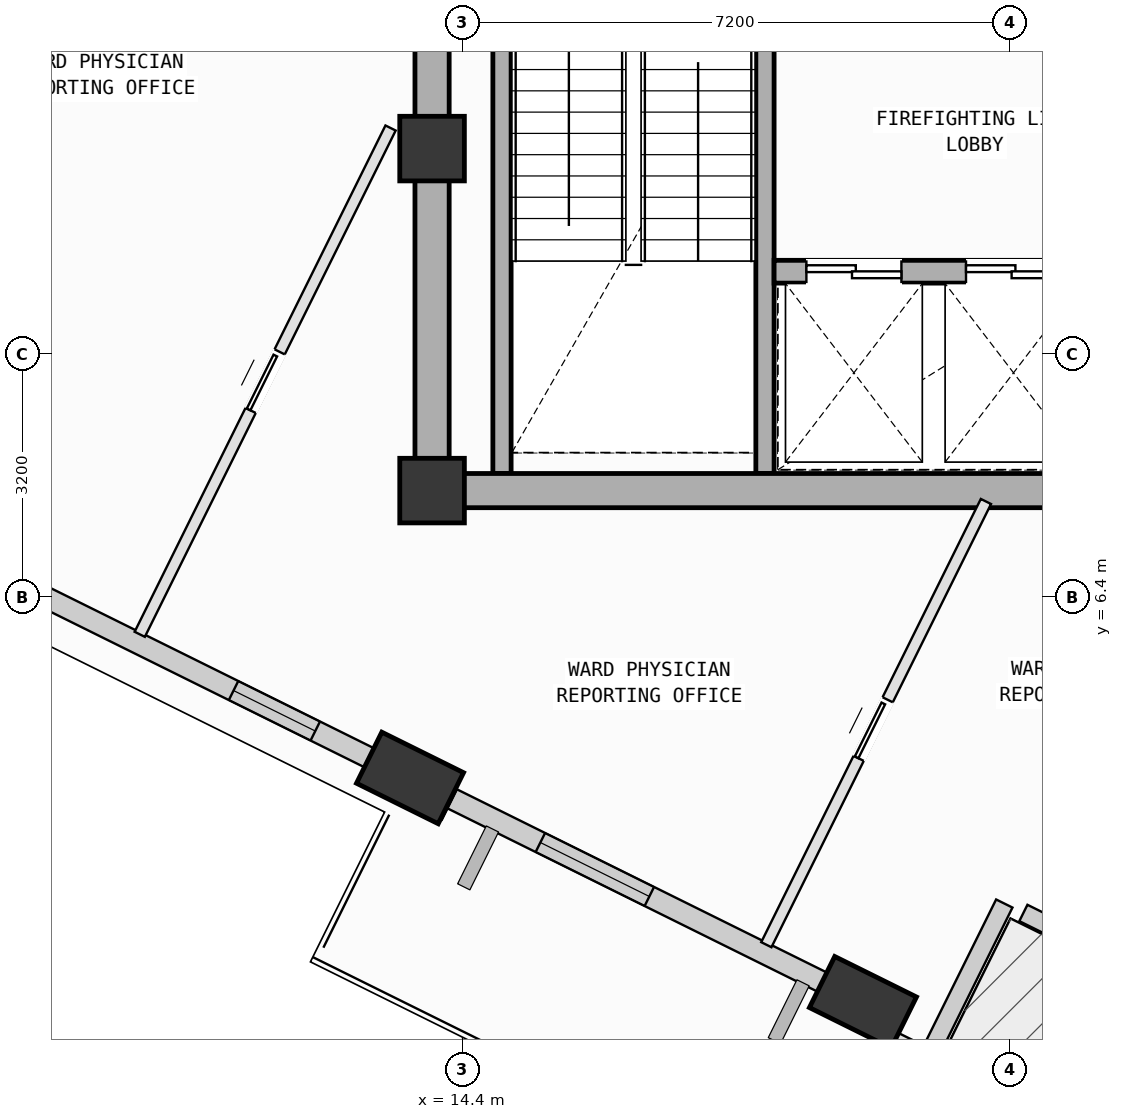
"""IFC4 building model, lengths in metres.
Left out: names, types, materials, properties, quantities, classifications, styles, units other than length and angle.
Written with IfcOpenShell. Run it as: python <this file> out.ifc"""

import sys

from ifc_helpers import new_model, si_unit, direction, frame, frame_2d, origin, origin_2d, place, context, subcontext, project, spatial, rectangle, extrude, element, fill, save


model = new_model("IFC4")
c1 = context("Model", 3, precision=1e-05, world=origin(), true_north=direction((0.0, 1.0)))
c2 = subcontext(c1, "Body", "Model", "MODEL_VIEW")
j1 = project(units=[si_unit("LENGTHUNIT", "METRE"), si_unit("PLANEANGLEUNIT", "RADIAN")], contexts=[c1])
p1 = place(None, origin())
s1 = spatial("IfcSite", under=j1, at=p1, CompositionType="ELEMENT")
p2 = place(p1, origin())
s2 = spatial("IfcBuilding", under=s1, at=p2, CompositionType="ELEMENT")
p3 = place(p2, frame((0.0, 0.0, 296.6)))
s3 = spatial("IfcBuildingStorey", under=s2, at=p3, CompositionType="ELEMENT", Elevation=296.6)
for number, where, z_axis, x_axis in (
    (1, (14.0, 7.8, 0.0), (0.0, 0.0, 1.0), (1.0, 0.0, 0.0)),
    (2, (14.0, 12.3, 0.0), (0.0, 0.0, 1.0), (1.0, 0.0, 0.0)),
):
    element("IfcColumn", number, at=place(p3, frame(where, z_axis=z_axis, x_axis=x_axis)), inside=s3, PredefinedType="COLUMN", context=c2, shape_type="SweptSolid", body=[
        extrude(rectangle(XDim=0.85, YDim=0.85, at=origin_2d()), origin(), (0.0, 0.0, 1.0), 4.0),
    ])
p4 = place(p3, frame((13.71, 4.019, 0.002), z_axis=(0.086199825799, -0.081164930977, 0.992966184727), x_axis=(-0.935172397804, -0.350272648593, 0.052551479838)))
e3 = element("IfcColumn", 3, at=p4, inside=s3, PredefinedType="COLUMN", context=c2, shape_type="SweptSolid", body=[
    extrude(rectangle(XDim=1.2, YDim=0.75, at=origin_2d()), origin(), (0.0, 0.0, 1.0), 4.025),
])
p5 = place(p3, frame((19.669, 1.067, 0.002), z_axis=(0.098208825475, -0.056509528132, 0.993560113848), x_axis=(-0.829149129966, -0.55676072121, 0.05029134711)))
e4 = element("IfcColumn", 4, at=p5, inside=s3, PredefinedType="COLUMN", context=c2, shape_type="SweptSolid", body=[
    extrude(rectangle(XDim=1.2, YDim=0.75, at=origin_2d()), origin(), (0.0, 0.0, 1.0), 4.022),
])
p6 = place(p3, frame((28.017, -0.846, 0.0), z_axis=(0.0, 0.0, 1.0), x_axis=(-0.89610459949, 0.443842930296, 0.0)))
e5 = element("IfcWall", 5, at=p6, inside=s3, PredefinedType="SOLIDWALL", context=c2, shape_type="SweptSolid", body=[
    extrude(rectangle(XDim=6.96, YDim=0.24, at=frame_2d((3.48, 0.0))), origin(), (0.0, 0.0, 1.0), 3.265),
])
p7 = place(p6, frame((2.04, 0.0, 0.0)))
e6 = element("IfcOpeningElement", 6, at=p7, cuts=e5, PredefinedType="OPENING", context=c2, shape_type="SweptSolid", body=[
    extrude(rectangle(XDim=1.1, YDim=2.15, at=frame_2d((0.55, 1.075))), frame((0.0, 0.13, 0.0), z_axis=(0.0, -1.0, 0.0), x_axis=(1.0, 0.0, 0.0)), (0.0, 0.0, 1.0), 0.26),
])
p8 = place(p3, frame((21.529, 2.367, 0.0), z_axis=(0.0, 0.0, 1.0), x_axis=(-0.443851040461, -0.896100582458, 0.0)))
e7 = element("IfcWall", 7, at=p8, inside=s3, PredefinedType="SOLIDWALL", context=c2, shape_type="SweptSolid", body=[
    extrude(rectangle(XDim=2.5, YDim=0.24, at=frame_2d((1.25, 0.0))), origin(), (0.0, 0.0, 1.0), 3.265),
])
p9 = place(p3, frame((13.563, 4.092, 0.0), z_axis=(0.0, 0.0, 1.0), x_axis=(-0.896112517924, 0.443826942873, 0.0)))
e8 = element("IfcWall", 8, at=p9, inside=s3, PredefinedType="SOLIDWALL", context=c2, shape_type="SweptSolid", body=[
    extrude(rectangle(XDim=5.83, YDim=0.28, at=frame_2d((2.915, 0.0))), origin(), (0.0, 0.0, 1.0), 3.265),
])
p10 = place(p9, frame((1.228, 0.0, 0.75)))
e9 = element("IfcOpeningElement", 9, at=p10, cuts=e8, PredefinedType="OPENING", context=c2, shape_type="SweptSolid", body=[
    extrude(rectangle(XDim=1.2, YDim=1.75, at=frame_2d((0.6, 0.875))), frame((0.0, 0.15, 0.0), z_axis=(0.0, -1.0, 0.0), x_axis=(1.0, 0.0, 0.0)), (0.0, 0.0, 1.0), 0.3),
])
p11 = place(p3, frame((19.517, 1.143, 0.0), z_axis=(0.0, 0.0, 1.0), x_axis=(-0.896103760266, 0.443844624658, 0.0)))
e10 = element("IfcWall", 10, at=p11, inside=s3, PredefinedType="SOLIDWALL", context=c2, shape_type="SweptSolid", body=[
    extrude(rectangle(XDim=5.861, YDim=0.28, at=frame_2d((2.93, 0.0))), origin(), (0.0, 0.0, 1.0), 3.245),
])
p12 = place(p11, frame((2.967, 0.0, 0.75)))
e11 = element("IfcOpeningElement", 11, at=p12, cuts=e10, PredefinedType="OPENING", context=c2, shape_type="SweptSolid", body=[
    extrude(rectangle(XDim=1.6, YDim=1.95, at=frame_2d((0.8, 0.975))), frame((0.0, 0.15, 0.0), z_axis=(0.0, -1.0, 0.0), x_axis=(1.0, 0.0, 0.0)), (0.0, 0.0, 1.0), 0.3),
])
for number, where, z_axis, x_axis in (
    (12, (18.38, 15.12, 0.0), (0.0, 0.0, 1.0), (0.0, -1.0, 0.0)),
    (13, (14.92, 8.025, 0.0), (0.0, 0.0, 1.0), (0.0, 1.0, 0.0)),
):
    element("IfcWall", number, at=place(p3, frame(where, z_axis=z_axis, x_axis=x_axis)), inside=s3, PredefinedType="SOLIDWALL", context=c2, shape_type="SweptSolid", body=[
        extrude(rectangle(XDim=7.095, YDim=0.24, at=frame_2d((3.548, 0.0))), origin(), (0.0, 0.0, 1.0), 3.78),
    ])
p13 = place(p3, frame((14.0, 7.8, 0.0), z_axis=(0.0, 0.0, 1.0), x_axis=(1.0, 0.0, 0.0)))
e14 = element("IfcWall", 14, at=p13, inside=s3, PredefinedType="SHEAR", context=c2, shape_type="SweptSolid", body=[
    extrude(rectangle(XDim=10.8, YDim=0.45, at=frame_2d((5.4, 0.0))), origin(), (0.0, 0.0, 1.0), 3.78),
])
p14 = place(p3, frame((14.0, 16.8, 0.0), z_axis=(0.0, 0.0, 1.0), x_axis=(0.0, -1.0, 0.0)))
e15 = element("IfcWall", 15, at=p14, inside=s3, PredefinedType="SHEAR", context=c2, shape_type="SweptSolid", body=[
    extrude(rectangle(XDim=9.0, YDim=0.45, at=frame_2d((4.5, 0.0))), origin(), (0.0, 0.0, 1.0), 3.78),
])
p15 = place(p3, frame((18.5, 10.68, 0.0), z_axis=(0.0, 0.0, 1.0), x_axis=(1.0, 0.0, 0.0)))
e16 = element("IfcWall", 16, at=p15, inside=s3, PredefinedType="SOLIDWALL", context=c2, shape_type="SweptSolid", body=[
    extrude(rectangle(XDim=5.3, YDim=0.3, at=frame_2d((2.65, 0.0))), origin(), (0.0, 0.0, 1.0), 3.78),
])
p16 = place(p15, frame((4.22, 0.0, 0.0)))
e17 = element("IfcOpeningElement", 17, at=p16, cuts=e16, PredefinedType="OPENING", context=c2, shape_type="SweptSolid", body=[
    extrude(rectangle(XDim=0.86, YDim=2.06, at=frame_2d((0.43, 1.03))), frame((0.0, 0.16, 0.0), z_axis=(0.0, -1.0, 0.0), x_axis=(1.0, 0.0, 0.0)), (0.0, 0.0, 1.0), 0.32),
])
p17 = place(p15, frame((0.425, 0.0, 0.0)))
e18 = element("IfcOpeningElement", 18, at=p17, cuts=e16, PredefinedType="OPENING", context=c2, shape_type="SweptSolid", body=[
    extrude(rectangle(XDim=1.25, YDim=2.18, at=frame_2d((0.625, 1.09))), frame((0.0, 0.16, 0.0), z_axis=(0.0, -1.0, 0.0), x_axis=(1.0, 0.0, 0.0)), (0.0, 0.0, 1.0), 0.32),
])
p18 = place(p15, frame((2.525, 0.0, 0.0)))
e19 = element("IfcOpeningElement", 19, at=p18, cuts=e16, PredefinedType="OPENING", context=c2, shape_type="SweptSolid", body=[
    extrude(rectangle(XDim=1.25, YDim=2.18, at=frame_2d((0.625, 1.09))), frame((0.0, 0.16, 0.0), z_axis=(0.0, -1.0, 0.0), x_axis=(1.0, 0.0, 0.0)), (0.0, 0.0, 1.0), 0.32),
])
p19 = place(p3, frame((20.458, 0.42, 0.0), z_axis=(0.0, 0.0, 1.0), x_axis=(-0.895932090446, 0.44419105046, 0.0)))
e20 = element("IfcWall", 20, at=p19, inside=s3, PredefinedType="PARTITIONING", context=c2, shape_type="SweptSolid", body=[
    extrude(rectangle(XDim=1.164, YDim=0.15, at=frame_2d((0.582, 0.0))), origin(), (0.0, 0.0, 1.0), 3.245),
])
p20 = place(p3, frame((18.398, 1.825, 0.0), z_axis=(0.0, 0.0, 1.0), x_axis=(0.443909549261, 0.89607159986, 0.0)))
e21 = element("IfcWall", 21, at=p20, inside=s3, PredefinedType="PARTITIONING", context=c2, shape_type="SweptSolid", body=[
    extrude(rectangle(XDim=6.509, YDim=0.15, at=frame_2d((3.254, 0.0))), origin(), (0.0, 0.0, 1.0), 3.78),
])
p21 = place(p20, frame((2.737, 0.0, 0.0)))
e22 = element("IfcOpeningElement", 22, at=p21, cuts=e21, PredefinedType="OPENING", context=c2, shape_type="SweptSolid", body=[
    extrude(rectangle(XDim=0.86, YDim=2.06, at=frame_2d((0.43, 1.03))), frame((0.0, 0.085, 0.0), z_axis=(0.0, -1.0, 0.0), x_axis=(1.0, 0.0, 0.0)), (0.0, 0.0, 1.0), 0.17),
])
p22 = place(p3, frame((14.163, 3.538, 0.0), z_axis=(0.0, 0.0, 1.0), x_axis=(-0.896041424615, 0.44397045552, 0.0)))
e23 = element("IfcWall", 23, at=p22, inside=s3, PredefinedType="PARTITIONING", context=c2, shape_type="SweptSolid", body=[
    extrude(rectangle(XDim=0.784, YDim=0.15, at=frame_2d((0.392, 0.0))), origin(), (0.0, 0.0, 1.0), 3.245),
])
p23 = place(p3, frame((10.154, 5.909, 0.0), z_axis=(0.0, 0.0, 1.0), x_axis=(0.443874121777, 0.896089149592, 0.0)))
e24 = element("IfcWall", 24, at=p23, inside=s3, PredefinedType="PARTITIONING", context=c2, shape_type="SweptSolid", body=[
    extrude(rectangle(XDim=7.435, YDim=0.15, at=frame_2d((3.717, 0.0))), origin(), (0.0, 0.0, 1.0), 3.78),
])
p24 = place(p23, frame((3.287, 0.0, 0.0)))
e25 = element("IfcOpeningElement", 25, at=p24, cuts=e24, PredefinedType="OPENING", context=c2, shape_type="SweptSolid", body=[
    extrude(rectangle(XDim=0.86, YDim=2.06, at=frame_2d((0.43, 1.03))), frame((0.0, 0.085, 0.0), z_axis=(0.0, -1.0, 0.0), x_axis=(1.0, 0.0, 0.0)), (0.0, 0.0, 1.0), 0.17),
])
p25 = place(p10, origin())
e26 = element("IfcWindow", 26, at=p25, inside=s3, PartitioningType="SINGLE_PANEL", PredefinedType="WINDOW", context=c2, shape_type="SweptSolid", body=[
    extrude(rectangle(XDim=1.2, YDim=1.75, at=frame_2d((0.6, 0.875))), frame((0.0, 0.03, 0.0), z_axis=(0.0, -1.0, 0.0), x_axis=(1.0, 0.0, 0.0)), (0.0, 0.0, 1.0), 0.06),
])
fill(e9, e26)
p26 = place(p12, origin())
e27 = element("IfcWindow", 27, at=p26, inside=s3, PartitioningType="SINGLE_PANEL", PredefinedType="WINDOW", context=c2, shape_type="SweptSolid", body=[
    extrude(rectangle(XDim=1.6, YDim=1.95, at=frame_2d((0.8, 0.975))), frame((0.0, 0.03, 0.0), z_axis=(0.0, -1.0, 0.0), x_axis=(1.0, 0.0, 0.0)), (0.0, 0.0, 1.0), 0.06),
])
fill(e11, e27)
p27 = place(p17, origin())
e28 = element("IfcDoor", 28, at=p27, inside=s3, OperationType="DOUBLE_DOOR_SLIDING", PredefinedType="DOOR", context=c2, shape_type="SweptSolid", body=[
    extrude(rectangle(XDim=1.25, YDim=2.18, at=frame_2d((0.625, 1.09))), frame((0.0, 0.025, 0.0), z_axis=(0.0, -1.0, 0.0), x_axis=(1.0, 0.0, 0.0)), (0.0, 0.0, 1.0), 0.05),
])
fill(e18, e28)
p28 = place(p18, origin())
e29 = element("IfcDoor", 29, at=p28, inside=s3, OperationType="DOUBLE_DOOR_SLIDING", PredefinedType="DOOR", context=c2, shape_type="SweptSolid", body=[
    extrude(rectangle(XDim=1.25, YDim=2.18, at=frame_2d((0.625, 1.09))), frame((0.0, 0.025, 0.0), z_axis=(0.0, -1.0, 0.0), x_axis=(1.0, 0.0, 0.0)), (0.0, 0.0, 1.0), 0.05),
])
fill(e19, e29)
p29 = place(p21, origin())
e30 = element("IfcDoor", 30, at=p29, inside=s3, OperationType="SLIDING_TO_LEFT", PredefinedType="DOOR", context=c2, shape_type="SweptSolid", body=[
    extrude(rectangle(XDim=0.86, YDim=2.06, at=frame_2d((0.43, 1.03))), frame((0.0, 0.025, 0.0), z_axis=(0.0, -1.0, 0.0), x_axis=(1.0, 0.0, 0.0)), (0.0, 0.0, 1.0), 0.05),
])
fill(e22, e30)
p30 = place(p24, origin())
e31 = element("IfcDoor", 31, at=p30, inside=s3, OperationType="SLIDING_TO_LEFT", PredefinedType="DOOR", context=c2, shape_type="SweptSolid", body=[
    extrude(rectangle(XDim=0.86, YDim=2.06, at=frame_2d((0.43, 1.03))), frame((0.0, 0.025, 0.0), z_axis=(0.0, -1.0, 0.0), x_axis=(1.0, 0.0, 0.0)), (0.0, 0.0, 1.0), 0.05),
])
fill(e25, e31)
save(model, sys.argv[1])
